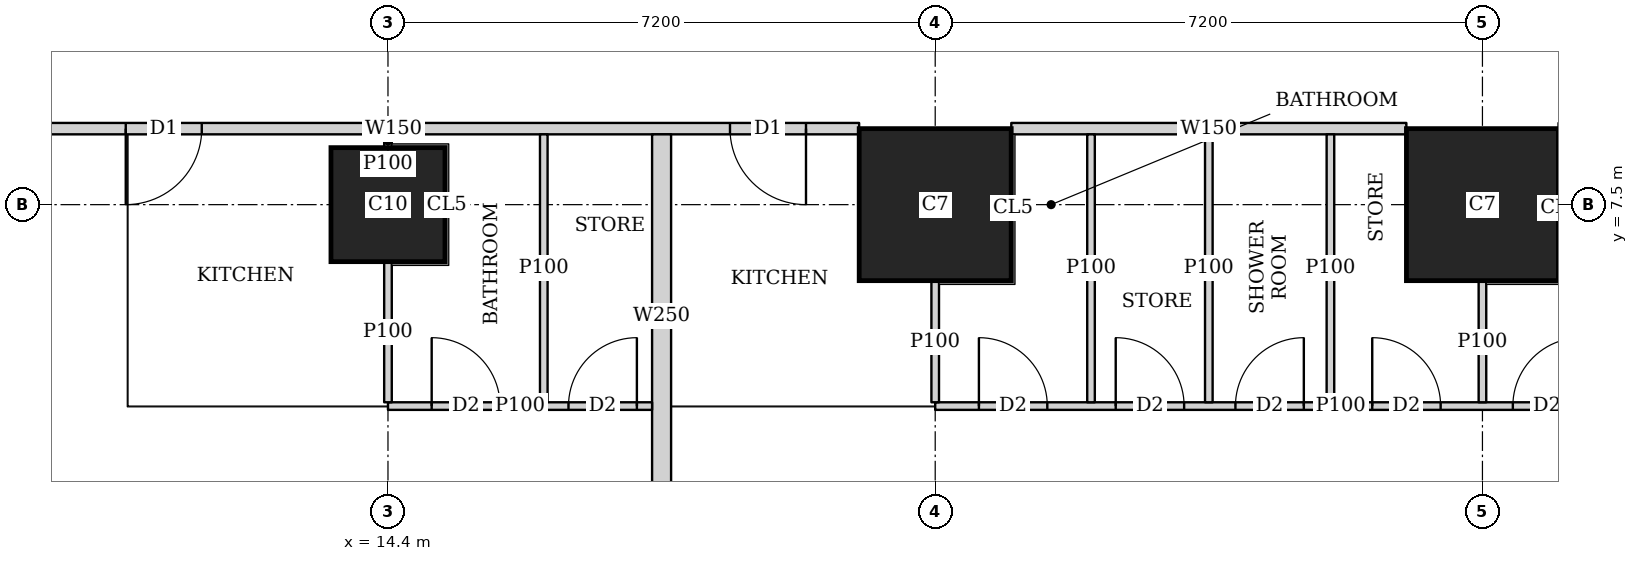
"""IFC4 building model, lengths in metres.
Left out: names, types, materials, properties, quantities, classifications, styles, units other than length and angle.
Written with IfcOpenShell. Run it as: python <this file> out.ifc"""

import sys

from ifc_helpers import new_model, si_unit, direction, frame, frame_2d, origin, origin_2d, place, context, subcontext, project, spatial, rectangle, extrude, element, fill, save


model = new_model("IFC4")
c1 = context("Model", 3, precision=1e-05, world=origin(), true_north=direction((0.0, 1.0)))
c2 = subcontext(c1, "Body", "Model", "MODEL_VIEW")
j1 = project(units=[si_unit("LENGTHUNIT", "METRE"), si_unit("PLANEANGLEUNIT", "RADIAN")], contexts=[c1])
p1 = place(None, origin())
s1 = spatial("IfcSite", under=j1, at=p1, CompositionType="ELEMENT")
p2 = place(p1, origin())
s2 = spatial("IfcBuilding", under=s1, at=p2, CompositionType="ELEMENT")
p3 = place(p2, frame((0.0, 0.0, 135.8)))
s3 = spatial("IfcBuildingStorey", under=s2, at=p3, CompositionType="ELEMENT", Elevation=135.8)
p4 = place(p3, frame((14.4, 7.5, 0.0), z_axis=(0.0, 0.0, 1.0), x_axis=(1.0, 0.0, 0.0)))
e1 = element("IfcColumn", 1, at=p4, inside=s3, PredefinedType="COLUMN", context=c2, shape_type="SweptSolid", body=[
    extrude(rectangle(XDim=1.5, YDim=1.5, at=origin_2d()), origin(), (0.0, 0.0, 1.0), 3.75),
])
for number, where, z_axis, x_axis in (
    (2, (21.6, 7.5, 0.0), (0.0, 0.0, 1.0), (1.0, 0.0, 0.0)),
    (3, (28.8, 7.5, 0.0), (0.0, 0.0, 1.0), (1.0, 0.0, 0.0)),
):
    element("IfcColumn", number, at=place(p3, frame(where, z_axis=z_axis, x_axis=x_axis)), inside=s3, PredefinedType="COLUMN", context=c2, shape_type="SweptSolid", body=[
        extrude(rectangle(XDim=2.0, YDim=2.0, at=origin_2d()), origin(), (0.0, 0.0, 1.0), 3.75),
    ])
p5 = place(p3, frame((27.799, 8.5, 0.0), z_axis=(0.0, 0.0, 1.0), x_axis=(-1.0, 0.0, 0.0)))
e4 = element("IfcWall", 4, at=p5, inside=s3, PredefinedType="SOLIDWALL", context=c2, shape_type="SweptSolid", body=[
    extrude(rectangle(XDim=5.198, YDim=0.15, at=frame_2d((2.599, 0.0))), origin(), (0.0, 0.0, 1.0), 3.5),
])
p6 = place(p3, frame((20.599, 8.5, 0.0), z_axis=(0.0, 0.0, 1.0), x_axis=(-1.0, 0.0, 0.0)))
e5 = element("IfcWall", 5, at=p6, inside=s3, PredefinedType="SOLIDWALL", context=c2, shape_type="SweptSolid", body=[
    extrude(rectangle(XDim=12.249, YDim=0.15, at=frame_2d((6.125, 0.0))), origin(), (0.0, 0.0, 1.0), 3.5),
])
p7 = place(p6, frame((8.649, 0.0, 0.0)))
e6 = element("IfcOpeningElement", 6, at=p7, cuts=e5, PredefinedType="OPENING", context=c2, shape_type="SweptSolid", body=[
    extrude(rectangle(XDim=1.0, YDim=2.1, at=frame_2d((0.5, 1.05))), frame((0.0, 0.085, 0.0), z_axis=(0.0, -1.0, 0.0), x_axis=(1.0, 0.0, 0.0)), (0.0, 0.0, 1.0), 0.17),
])
p8 = place(p6, frame((0.699, 0.0, 0.0)))
e7 = element("IfcOpeningElement", 7, at=p8, cuts=e5, PredefinedType="OPENING", context=c2, shape_type="SweptSolid", body=[
    extrude(rectangle(XDim=1.0, YDim=2.1, at=frame_2d((0.5, 1.05))), frame((0.0, 0.085, 0.0), z_axis=(0.0, -1.0, 0.0), x_axis=(1.0, 0.0, 0.0)), (0.0, 0.0, 1.0), 0.17),
])
p9 = place(p3, frame((17.875, 4.85, 0.0), z_axis=(0.0, 0.0, 1.0), x_axis=(-1.0, 0.0, 0.0)))
e8 = element("IfcWall", 8, at=p9, inside=s3, PredefinedType="PARTITIONING", context=c2, shape_type="SweptSolid", body=[
    extrude(rectangle(XDim=3.475, YDim=0.1, at=frame_2d((1.738, 0.0))), origin(), (0.0, 0.0, 1.0), 3.5),
])
p10 = place(p9, frame((2.0, 0.0, 0.0)))
e9 = element("IfcOpeningElement", 9, at=p10, cuts=e8, PredefinedType="OPENING", context=c2, shape_type="SweptSolid", body=[
    extrude(rectangle(XDim=0.9, YDim=2.1, at=frame_2d((0.45, 1.05))), frame((0.0, 0.06, 0.0), z_axis=(0.0, -1.0, 0.0), x_axis=(1.0, 0.0, 0.0)), (0.0, 0.0, 1.0), 0.12),
])
p11 = place(p9, frame((0.2, 0.0, 0.0)))
e10 = element("IfcOpeningElement", 10, at=p11, cuts=e8, PredefinedType="OPENING", context=c2, shape_type="SweptSolid", body=[
    extrude(rectangle(XDim=0.9, YDim=2.1, at=frame_2d((0.45, 1.05))), frame((0.0, 0.06, 0.0), z_axis=(0.0, -1.0, 0.0), x_axis=(1.0, 0.0, 0.0)), (0.0, 0.0, 1.0), 0.12),
])
p12 = place(p3, frame((14.4, 4.9, 0.0), z_axis=(0.0, 0.0, 1.0), x_axis=(0.0, 1.0, 0.0)))
e11 = element("IfcWall", 11, at=p12, inside=s3, PredefinedType="PARTITIONING", context=c2, shape_type="SweptSolid", body=[
    extrude(rectangle(XDim=1.849, YDim=0.1, at=frame_2d((0.925, 0.0))), origin(), (0.0, 0.0, 1.0), 3.5),
])
p13 = place(p3, frame((14.4, 8.251, 0.0), z_axis=(0.0, 0.0, 1.0), x_axis=(0.0, 1.0, 0.0)))
e12 = element("IfcWall", 12, at=p13, inside=s3, PredefinedType="PARTITIONING", context=c2, shape_type="SweptSolid", body=[
    extrude(rectangle(XDim=0.174, YDim=0.1, at=frame_2d((0.087, 0.0))), origin(), (0.0, 0.0, 1.0), 3.5),
])
p14 = place(p3, frame((16.45, 4.9, 0.0), z_axis=(0.0, 0.0, 1.0), x_axis=(0.0, 1.0, 0.0)))
e13 = element("IfcWall", 13, at=p14, inside=s3, PredefinedType="PARTITIONING", context=c2, shape_type="SweptSolid", body=[
    extrude(rectangle(XDim=3.525, YDim=0.1, at=frame_2d((1.763, 0.0))), origin(), (0.0, 0.0, 1.0), 3.5),
])
p15 = place(p3, frame((32.275, 4.85, 0.0), z_axis=(0.0, 0.0, 1.0), x_axis=(-1.0, 0.0, 0.0)))
e14 = element("IfcWall", 14, at=p15, inside=s3, PredefinedType="PARTITIONING", context=c2, shape_type="SweptSolid", body=[
    extrude(rectangle(XDim=10.675, YDim=0.1, at=frame_2d((5.337, 0.0))), origin(), (0.0, 0.0, 1.0), 3.5),
])
p16 = place(p15, frame((9.2, 0.0, 0.0)))
e15 = element("IfcOpeningElement", 15, at=p16, cuts=e14, PredefinedType="OPENING", context=c2, shape_type="SweptSolid", body=[
    extrude(rectangle(XDim=0.9, YDim=2.1, at=frame_2d((0.45, 1.05))), frame((0.0, 0.06, 0.0), z_axis=(0.0, -1.0, 0.0), x_axis=(1.0, 0.0, 0.0)), (0.0, 0.0, 1.0), 0.12),
])
p17 = place(p15, frame((5.825, 0.0, 0.0)))
e16 = element("IfcOpeningElement", 16, at=p17, cuts=e14, PredefinedType="OPENING", context=c2, shape_type="SweptSolid", body=[
    extrude(rectangle(XDim=0.9, YDim=2.1, at=frame_2d((0.45, 1.05))), frame((0.0, 0.06, 0.0), z_axis=(0.0, -1.0, 0.0), x_axis=(1.0, 0.0, 0.0)), (0.0, 0.0, 1.0), 0.12),
])
p18 = place(p15, frame((2.175, 0.0, 0.0)))
e17 = element("IfcOpeningElement", 17, at=p18, cuts=e14, PredefinedType="OPENING", context=c2, shape_type="SweptSolid", body=[
    extrude(rectangle(XDim=0.9, YDim=2.1, at=frame_2d((0.45, 1.05))), frame((0.0, 0.06, 0.0), z_axis=(0.0, -1.0, 0.0), x_axis=(1.0, 0.0, 0.0)), (0.0, 0.0, 1.0), 0.12),
])
p19 = place(p15, frame((7.4, 0.0, 0.0)))
e18 = element("IfcOpeningElement", 18, at=p19, cuts=e14, PredefinedType="OPENING", context=c2, shape_type="SweptSolid", body=[
    extrude(rectangle(XDim=0.9, YDim=2.1, at=frame_2d((0.45, 1.05))), frame((0.0, 0.06, 0.0), z_axis=(0.0, -1.0, 0.0), x_axis=(1.0, 0.0, 0.0)), (0.0, 0.0, 1.0), 0.12),
])
p20 = place(p15, frame((4.025, 0.0, 0.0)))
e19 = element("IfcOpeningElement", 19, at=p20, cuts=e14, PredefinedType="OPENING", context=c2, shape_type="SweptSolid", body=[
    extrude(rectangle(XDim=0.9, YDim=2.1, at=frame_2d((0.45, 1.05))), frame((0.0, 0.06, 0.0), z_axis=(0.0, -1.0, 0.0), x_axis=(1.0, 0.0, 0.0)), (0.0, 0.0, 1.0), 0.12),
])
p21 = place(p15, frame((0.375, 0.0, 0.0)))
e20 = element("IfcOpeningElement", 20, at=p21, cuts=e14, PredefinedType="OPENING", context=c2, shape_type="SweptSolid", body=[
    extrude(rectangle(XDim=0.9, YDim=2.1, at=frame_2d((0.45, 1.05))), frame((0.0, 0.06, 0.0), z_axis=(0.0, -1.0, 0.0), x_axis=(1.0, 0.0, 0.0)), (0.0, 0.0, 1.0), 0.12),
])
p22 = place(p3, frame((21.6, 4.9, 0.0), z_axis=(0.0, 0.0, 1.0), x_axis=(0.0, 1.0, 0.0)))
e21 = element("IfcWall", 21, at=p22, inside=s3, PredefinedType="PARTITIONING", context=c2, shape_type="SweptSolid", body=[
    extrude(rectangle(XDim=1.599, YDim=0.1, at=frame_2d((0.8, 0.0))), origin(), (0.0, 0.0, 1.0), 3.5),
])
p23 = place(p3, frame((25.2, 4.9, 0.0), z_axis=(0.0, 0.0, 1.0), x_axis=(0.0, 1.0, 0.0)))
e22 = element("IfcWall", 22, at=p23, inside=s3, PredefinedType="PARTITIONING", context=c2, shape_type="SweptSolid", body=[
    extrude(rectangle(XDim=3.525, YDim=0.1, at=frame_2d((1.763, 0.0))), origin(), (0.0, 0.0, 1.0), 3.5),
])
p24 = place(p3, frame((28.8, 4.9, 0.0), z_axis=(0.0, 0.0, 1.0), x_axis=(0.0, 1.0, 0.0)))
e23 = element("IfcWall", 23, at=p24, inside=s3, PredefinedType="PARTITIONING", context=c2, shape_type="SweptSolid", body=[
    extrude(rectangle(XDim=1.599, YDim=0.1, at=frame_2d((0.8, 0.0))), origin(), (0.0, 0.0, 1.0), 3.5),
])
for number, where, z_axis, x_axis in (
    (24, (23.65, 4.9, 0.0), (0.0, 0.0, 1.0), (0.0, 1.0, 0.0)),
    (25, (26.8, 4.9, 0.0), (0.0, 0.0, 1.0), (0.0, 1.0, 0.0)),
):
    element("IfcWall", number, at=place(p3, frame(where, z_axis=z_axis, x_axis=x_axis)), inside=s3, PredefinedType="PARTITIONING", context=c2, shape_type="SweptSolid", body=[
        extrude(rectangle(XDim=3.525, YDim=0.1, at=frame_2d((1.763, 0.0))), origin(), (0.0, 0.0, 1.0), 3.5),
    ])
p25 = place(p3, frame((18.0, 3.65, 0.0), z_axis=(0.0, 0.0, 1.0), x_axis=(0.0, 1.0, 0.0)))
e26 = element("IfcWall", 26, at=p25, inside=s3, PredefinedType="SOLIDWALL", context=c2, shape_type="SweptSolid", body=[
    extrude(rectangle(XDim=4.775, YDim=0.25, at=frame_2d((2.388, 0.0))), origin(), (0.0, 0.0, 1.0), 3.5),
])
p26 = place(p10, origin())
e27 = element("IfcDoor", 27, at=p26, inside=s3, OperationType="SINGLE_SWING_LEFT", PredefinedType="DOOR", context=c2, shape_type="SweptSolid", body=[
    extrude(rectangle(XDim=0.9, YDim=2.1, at=frame_2d((0.45, 1.05))), frame((0.0, 0.025, 0.0), z_axis=(0.0, -1.0, 0.0), x_axis=(1.0, 0.0, 0.0)), (0.0, 0.0, 1.0), 0.05),
])
fill(e9, e27)
p27 = place(p11, origin())
e28 = element("IfcDoor", 28, at=p27, inside=s3, OperationType="SINGLE_SWING_RIGHT", PredefinedType="DOOR", context=c2, shape_type="SweptSolid", body=[
    extrude(rectangle(XDim=0.9, YDim=2.1, at=frame_2d((0.45, 1.05))), frame((0.0, 0.025, 0.0), z_axis=(0.0, -1.0, 0.0), x_axis=(1.0, 0.0, 0.0)), (0.0, 0.0, 1.0), 0.05),
])
fill(e10, e28)
p28 = place(p7, origin())
e29 = element("IfcDoor", 29, at=p28, inside=s3, OperationType="SINGLE_SWING_RIGHT", PredefinedType="DOOR", context=c2, shape_type="SweptSolid", body=[
    extrude(rectangle(XDim=1.0, YDim=2.1, at=frame_2d((0.5, 1.05))), frame((0.0, 0.025, 0.0), z_axis=(0.0, -1.0, 0.0), x_axis=(1.0, 0.0, 0.0)), (0.0, 0.0, 1.0), 0.05),
])
fill(e6, e29)
p29 = place(p16, origin())
e30 = element("IfcDoor", 30, at=p29, inside=s3, OperationType="SINGLE_SWING_LEFT", PredefinedType="DOOR", context=c2, shape_type="SweptSolid", body=[
    extrude(rectangle(XDim=0.9, YDim=2.1, at=frame_2d((0.45, 1.05))), frame((0.0, 0.025, 0.0), z_axis=(0.0, -1.0, 0.0), x_axis=(1.0, 0.0, 0.0)), (0.0, 0.0, 1.0), 0.05),
])
fill(e15, e30)
p30 = place(p17, origin())
e31 = element("IfcDoor", 31, at=p30, inside=s3, OperationType="SINGLE_SWING_RIGHT", PredefinedType="DOOR", context=c2, shape_type="SweptSolid", body=[
    extrude(rectangle(XDim=0.9, YDim=2.1, at=frame_2d((0.45, 1.05))), frame((0.0, 0.025, 0.0), z_axis=(0.0, -1.0, 0.0), x_axis=(1.0, 0.0, 0.0)), (0.0, 0.0, 1.0), 0.05),
])
fill(e16, e31)
p31 = place(p18, origin())
e32 = element("IfcDoor", 32, at=p31, inside=s3, OperationType="SINGLE_SWING_RIGHT", PredefinedType="DOOR", context=c2, shape_type="SweptSolid", body=[
    extrude(rectangle(XDim=0.9, YDim=2.1, at=frame_2d((0.45, 1.05))), frame((0.0, 0.025, 0.0), z_axis=(0.0, -1.0, 0.0), x_axis=(1.0, 0.0, 0.0)), (0.0, 0.0, 1.0), 0.05),
])
fill(e17, e32)
p32 = place(p19, origin())
e33 = element("IfcDoor", 33, at=p32, inside=s3, OperationType="SINGLE_SWING_LEFT", PredefinedType="DOOR", context=c2, shape_type="SweptSolid", body=[
    extrude(rectangle(XDim=0.9, YDim=2.1, at=frame_2d((0.45, 1.05))), frame((0.0, 0.025, 0.0), z_axis=(0.0, -1.0, 0.0), x_axis=(1.0, 0.0, 0.0)), (0.0, 0.0, 1.0), 0.05),
])
fill(e18, e33)
p33 = place(p20, origin())
e34 = element("IfcDoor", 34, at=p33, inside=s3, OperationType="SINGLE_SWING_LEFT", PredefinedType="DOOR", context=c2, shape_type="SweptSolid", body=[
    extrude(rectangle(XDim=0.9, YDim=2.1, at=frame_2d((0.45, 1.05))), frame((0.0, 0.025, 0.0), z_axis=(0.0, -1.0, 0.0), x_axis=(1.0, 0.0, 0.0)), (0.0, 0.0, 1.0), 0.05),
])
fill(e19, e34)
p34 = place(p8, origin())
e35 = element("IfcDoor", 35, at=p34, inside=s3, OperationType="SINGLE_SWING_LEFT", PredefinedType="DOOR", context=c2, shape_type="SweptSolid", body=[
    extrude(rectangle(XDim=1.0, YDim=2.1, at=frame_2d((0.5, 1.05))), frame((0.0, 0.025, 0.0), z_axis=(0.0, -1.0, 0.0), x_axis=(1.0, 0.0, 0.0)), (0.0, 0.0, 1.0), 0.05),
])
fill(e7, e35)
save(model, sys.argv[1])
